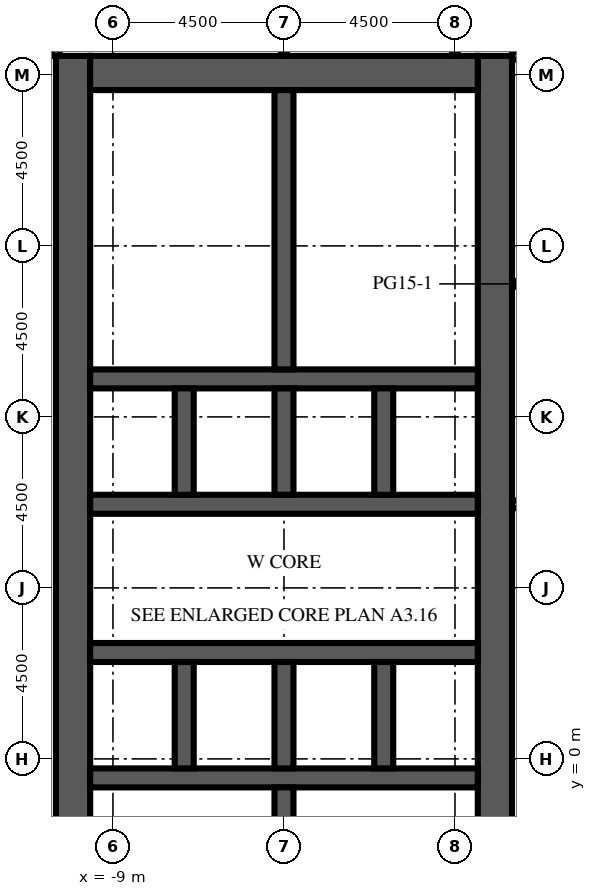
"""IFC4 building model, lengths in metres.
Left out: names, types, materials, properties, quantities, classifications, styles, units other than length and angle.
Written with IfcOpenShell. Run it as: python <this file> out.ifc"""

import sys

from ifc_helpers import new_model, si_unit, direction, frame, frame_2d, origin, place, context, subcontext, project, spatial, rectangle, extrude, element, fill, save


model = new_model("IFC4")
c1 = context("Model", 3, precision=1e-05, world=origin(), true_north=direction((0.0, 1.0)))
c2 = subcontext(c1, "Body", "Model", "MODEL_VIEW")
j1 = project(units=[si_unit("LENGTHUNIT", "METRE"), si_unit("PLANEANGLEUNIT", "RADIAN")], contexts=[c1])
p1 = place(None, origin())
s1 = spatial("IfcSite", under=j1, at=p1, CompositionType="ELEMENT")
p2 = place(p1, origin())
s2 = spatial("IfcBuilding", under=s1, at=p2, CompositionType="ELEMENT")
p3 = place(p2, frame((0.0, 0.0, 98.4)))
s3 = spatial("IfcBuildingStorey", under=s2, at=p3, CompositionType="ELEMENT", Elevation=98.4)
p4 = place(p3, frame((-10.05, -9.0, 0.0), z_axis=(0.0, 0.0, 1.0), x_axis=(0.0, 1.0, 0.0)))
e1 = element("IfcWall", 1, at=p4, inside=s3, PredefinedType="SHEAR", context=c2, shape_type="SweptSolid", body=[
    extrude(rectangle(XDim=27.5, YDim=0.9, at=frame_2d((13.75, 0.0))), origin(), (0.0, 0.0, 1.0), 4.1),
])
p5 = place(p4, frame((12.55, 0.0, 0.0)))
e2 = element("IfcOpeningElement", 2, at=p5, cuts=e1, PredefinedType="OPENING", context=c2, shape_type="SweptSolid", body=[
    extrude(rectangle(XDim=2.4, YDim=2.4, at=frame_2d((1.2, 1.2))), frame((0.0, 0.46, 0.0), z_axis=(0.0, -1.0, 0.0), x_axis=(1.0, 0.0, 0.0)), (0.0, 0.0, 1.0), 0.92),
])
p6 = place(p4, frame((6.825, 0.0, 0.0)))
e3 = element("IfcOpeningElement", 3, at=p6, cuts=e1, PredefinedType="OPENING", context=c2, shape_type="SweptSolid", body=[
    extrude(rectangle(XDim=1.2, YDim=2.1, at=frame_2d((0.6, 1.05))), frame((0.0, 0.46, 0.0), z_axis=(0.0, -1.0, 0.0), x_axis=(1.0, 0.0, 0.0)), (0.0, 0.0, 1.0), 0.92),
])
p7 = place(p4, frame((19.475, 0.0, 0.0)))
e4 = element("IfcOpeningElement", 4, at=p7, cuts=e1, PredefinedType="OPENING", context=c2, shape_type="SweptSolid", body=[
    extrude(rectangle(XDim=1.2, YDim=2.1, at=frame_2d((0.6, 1.05))), frame((0.0, 0.46, 0.0), z_axis=(0.0, -1.0, 0.0), x_axis=(1.0, 0.0, 0.0)), (0.0, 0.0, 1.0), 0.92),
])
p8 = place(p3, frame((1.05, -9.0, 0.0), z_axis=(0.0, 0.0, 1.0), x_axis=(0.0, 1.0, 0.0)))
e5 = element("IfcWall", 5, at=p8, inside=s3, PredefinedType="SHEAR", context=c2, shape_type="SweptSolid", body=[
    extrude(rectangle(XDim=27.5, YDim=0.9, at=frame_2d((13.75, 0.0))), origin(), (0.0, 0.0, 1.0), 4.1),
])
p9 = place(p8, frame((12.55, 0.0, 0.0)))
e6 = element("IfcOpeningElement", 6, at=p9, cuts=e5, PredefinedType="OPENING", context=c2, shape_type="SweptSolid", body=[
    extrude(rectangle(XDim=2.4, YDim=2.4, at=frame_2d((1.2, 1.2))), frame((0.0, 0.46, 0.0), z_axis=(0.0, -1.0, 0.0), x_axis=(1.0, 0.0, 0.0)), (0.0, 0.0, 1.0), 0.92),
])
p10 = place(p8, frame((3.893, 0.0, 0.0)))
e7 = element("IfcOpeningElement", 7, at=p10, cuts=e5, PredefinedType="OPENING", context=c2, shape_type="SweptSolid", body=[
    extrude(rectangle(XDim=0.923, YDim=2.1, at=frame_2d((0.461, 1.05))), frame((0.0, 0.46, 0.0), z_axis=(0.0, -1.0, 0.0), x_axis=(1.0, 0.0, 0.0)), (0.0, 0.0, 1.0), 0.92),
])
p11 = place(p8, frame((23.427, 0.0, 0.0)))
e8 = element("IfcOpeningElement", 8, at=p11, cuts=e5, PredefinedType="OPENING", context=c2, shape_type="SweptSolid", body=[
    extrude(rectangle(XDim=1.2, YDim=2.1, at=frame_2d((0.6, 1.05))), frame((0.0, 0.46, 0.0), z_axis=(0.0, -1.0, 0.0), x_axis=(1.0, 0.0, 0.0)), (0.0, 0.0, 1.0), 0.92),
])
p12 = place(p3, frame((-9.6, 18.05, 0.0), z_axis=(0.0, 0.0, 1.0), x_axis=(1.0, 0.0, 0.0)))
e9 = element("IfcWall", 9, at=p12, inside=s3, PredefinedType="SHEAR", context=c2, shape_type="SweptSolid", body=[
    extrude(rectangle(XDim=10.2, YDim=0.9, at=frame_2d((5.1, 0.0))), origin(), (0.0, 0.0, 1.0), 4.1),
])
p13 = place(p3, frame((-9.6, -0.5, 0.0), z_axis=(0.0, 0.0, 1.0), x_axis=(1.0, 0.0, 0.0)))
e10 = element("IfcWall", 10, at=p13, inside=s3, PredefinedType="SHEAR", context=c2, shape_type="SweptSolid", body=[
    extrude(rectangle(XDim=10.2, YDim=0.5, at=frame_2d((5.1, 0.0))), origin(), (0.0, 0.0, 1.0), 4.1),
])
p14 = place(p3, frame((-9.6, 2.8, 0.0), z_axis=(0.0, 0.0, 1.0), x_axis=(1.0, 0.0, 0.0)))
e11 = element("IfcWall", 11, at=p14, inside=s3, PredefinedType="SHEAR", context=c2, shape_type="SweptSolid", body=[
    extrude(rectangle(XDim=10.2, YDim=0.5, at=frame_2d((5.1, 0.0))), origin(), (0.0, 0.0, 1.0), 4.1),
])
p15 = place(p14, frame((0.562, 0.0, 0.0)))
e12 = element("IfcOpeningElement", 12, at=p15, cuts=e11, PredefinedType="OPENING", context=c2, shape_type="SweptSolid", body=[
    extrude(rectangle(XDim=1.1, YDim=2.1, at=frame_2d((0.55, 1.05))), frame((0.0, 0.26, 0.0), z_axis=(0.0, -1.0, 0.0), x_axis=(1.0, 0.0, 0.0)), (0.0, 0.0, 1.0), 0.52),
])
p16 = place(p14, frame((3.238, 0.0, 0.0)))
e13 = element("IfcOpeningElement", 13, at=p16, cuts=e11, PredefinedType="OPENING", context=c2, shape_type="SweptSolid", body=[
    extrude(rectangle(XDim=1.1, YDim=2.1, at=frame_2d((0.55, 1.05))), frame((0.0, 0.26, 0.0), z_axis=(0.0, -1.0, 0.0), x_axis=(1.0, 0.0, 0.0)), (0.0, 0.0, 1.0), 0.52),
])
p17 = place(p14, frame((8.538, 0.0, 0.0)))
e14 = element("IfcOpeningElement", 14, at=p17, cuts=e11, PredefinedType="OPENING", context=c2, shape_type="SweptSolid", body=[
    extrude(rectangle(XDim=1.1, YDim=2.1, at=frame_2d((0.55, 1.05))), frame((0.0, 0.26, 0.0), z_axis=(0.0, -1.0, 0.0), x_axis=(1.0, 0.0, 0.0)), (0.0, 0.0, 1.0), 0.52),
])
p18 = place(p3, frame((-9.6, 6.7, 0.0), z_axis=(0.0, 0.0, 1.0), x_axis=(1.0, 0.0, 0.0)))
e15 = element("IfcWall", 15, at=p18, inside=s3, PredefinedType="SHEAR", context=c2, shape_type="SweptSolid", body=[
    extrude(rectangle(XDim=10.2, YDim=0.5, at=frame_2d((5.1, 0.0))), origin(), (0.0, 0.0, 1.0), 4.1),
])
p19 = place(p18, frame((0.562, 0.0, 0.0)))
e16 = element("IfcOpeningElement", 16, at=p19, cuts=e15, PredefinedType="OPENING", context=c2, shape_type="SweptSolid", body=[
    extrude(rectangle(XDim=1.1, YDim=2.1, at=frame_2d((0.55, 1.05))), frame((0.0, 0.26, 0.0), z_axis=(0.0, -1.0, 0.0), x_axis=(1.0, 0.0, 0.0)), (0.0, 0.0, 1.0), 0.52),
])
p20 = place(p18, frame((3.288, 0.0, 0.0)))
e17 = element("IfcOpeningElement", 17, at=p20, cuts=e15, PredefinedType="OPENING", context=c2, shape_type="SweptSolid", body=[
    extrude(rectangle(XDim=1.0, YDim=2.1, at=frame_2d((0.5, 1.05))), frame((0.0, 0.26, 0.0), z_axis=(0.0, -1.0, 0.0), x_axis=(1.0, 0.0, 0.0)), (0.0, 0.0, 1.0), 0.52),
])
p21 = place(p18, frame((5.913, 0.0, 0.0)))
e18 = element("IfcOpeningElement", 18, at=p21, cuts=e15, PredefinedType="OPENING", context=c2, shape_type="SweptSolid", body=[
    extrude(rectangle(XDim=1.0, YDim=2.1, at=frame_2d((0.5, 1.05))), frame((0.0, 0.26, 0.0), z_axis=(0.0, -1.0, 0.0), x_axis=(1.0, 0.0, 0.0)), (0.0, 0.0, 1.0), 0.52),
])
p22 = place(p18, frame((8.587, 0.0, 0.0)))
e19 = element("IfcOpeningElement", 19, at=p22, cuts=e15, PredefinedType="OPENING", context=c2, shape_type="SweptSolid", body=[
    extrude(rectangle(XDim=1.0, YDim=2.1, at=frame_2d((0.5, 1.05))), frame((0.0, 0.26, 0.0), z_axis=(0.0, -1.0, 0.0), x_axis=(1.0, 0.0, 0.0)), (0.0, 0.0, 1.0), 0.52),
])
p23 = place(p3, frame((-9.6, 10.0, 0.0), z_axis=(0.0, 0.0, 1.0), x_axis=(1.0, 0.0, 0.0)))
e20 = element("IfcWall", 20, at=p23, inside=s3, PredefinedType="SHEAR", context=c2, shape_type="SweptSolid", body=[
    extrude(rectangle(XDim=10.2, YDim=0.5, at=frame_2d((5.1, 0.0))), origin(), (0.0, 0.0, 1.0), 4.1),
])
for number, where, z_axis, x_axis in (
    (21, (-7.125, -0.25, 0.0), (0.0, 0.0, 1.0), (0.0, 1.0, 0.0)),
    (22, (-7.125, 6.95, 0.0), (0.0, 0.0, 1.0), (0.0, 1.0, 0.0)),
    (23, (-4.5, -0.25, 0.0), (0.0, 0.0, 1.0), (0.0, 1.0, 0.0)),
    (24, (-4.5, 6.95, 0.0), (0.0, 0.0, 1.0), (0.0, 1.0, 0.0)),
    (25, (-1.875, -0.25, 0.0), (0.0, 0.0, 1.0), (0.0, 1.0, 0.0)),
    (26, (-1.875, 6.95, 0.0), (0.0, 0.0, 1.0), (0.0, 1.0, 0.0)),
):
    element("IfcWall", number, at=place(p3, frame(where, z_axis=z_axis, x_axis=x_axis)), inside=s3, PredefinedType="SHEAR", context=c2, shape_type="SweptSolid", body=[
        extrude(rectangle(XDim=2.8, YDim=0.5, at=frame_2d((1.4, 0.0))), origin(), (0.0, 0.0, 1.0), 4.1),
    ])
for number, where, z_axis, x_axis in (
    (27, (-4.5, -8.1, 0.0), (0.0, 0.0, 1.0), (0.0, 1.0, 0.0)),
    (28, (-4.5, 10.25, 0.0), (0.0, 0.0, 1.0), (0.0, 1.0, 0.0)),
):
    element("IfcWall", number, at=place(p3, frame(where, z_axis=z_axis, x_axis=x_axis)), inside=s3, PredefinedType="SHEAR", context=c2, shape_type="SweptSolid", body=[
        extrude(rectangle(XDim=7.35, YDim=0.5, at=frame_2d((3.675, 0.0))), origin(), (0.0, 0.0, 1.0), 4.1),
    ])
p24 = place(p3, frame((-2.407, -3.984, 0.0), z_axis=(0.0, 0.0, 1.0), x_axis=(0.0, 1.0, 0.0)))
e29 = element("IfcWall", 29, at=p24, inside=s3, PredefinedType="PARTITIONING", context=c2, shape_type="SweptSolid", body=[
    extrude(rectangle(XDim=3.234, YDim=0.1, at=frame_2d((1.617, 0.0))), origin(), (0.0, 0.0, 1.0), 3.65),
])
p25 = place(p3, frame((-0.7, 12.455, 0.0), z_axis=(0.0, 0.0, 1.0), x_axis=(1.0, 0.0, 0.0)))
e30 = element("IfcWall", 30, at=p25, inside=s3, PredefinedType="PARTITIONING", context=c2, shape_type="SweptSolid", body=[
    extrude(rectangle(XDim=1.3, YDim=0.1, at=frame_2d((0.65, 0.0))), origin(), (0.0, 0.0, 1.0), 3.65),
])
p26 = place(p25, frame((0.2, 0.0, 0.0)))
e31 = element("IfcOpeningElement", 31, at=p26, cuts=e30, PredefinedType="OPENING", context=c2, shape_type="SweptSolid", body=[
    extrude(rectangle(XDim=0.9, YDim=2.1, at=frame_2d((0.45, 1.05))), frame((0.0, 0.06, 0.0), z_axis=(0.0, -1.0, 0.0), x_axis=(1.0, 0.0, 0.0)), (0.0, 0.0, 1.0), 0.12),
])
p27 = place(p3, frame((-4.25, 12.455, 0.0), z_axis=(0.0, 0.0, 1.0), x_axis=(1.0, 0.0, 0.0)))
e32 = element("IfcWall", 32, at=p27, inside=s3, PredefinedType="PARTITIONING", context=c2, shape_type="SweptSolid", body=[
    extrude(rectangle(XDim=3.55, YDim=0.1, at=frame_2d((1.775, 0.0))), origin(), (0.0, 0.0, 1.0), 3.65),
])
p28 = place(p3, frame((-0.7, 12.455, 0.0), z_axis=(0.0, 0.0, 1.0), x_axis=(0.0, 1.0, 0.0)))
e33 = element("IfcWall", 33, at=p28, inside=s3, PredefinedType="PARTITIONING", context=c2, shape_type="SweptSolid", body=[
    extrude(rectangle(XDim=2.573, YDim=0.1, at=frame_2d((1.286, 0.0))), origin(), (0.0, 0.0, 1.0), 3.65),
])
p29 = place(p28, frame((0.786, 0.0, 0.0)))
e34 = element("IfcOpeningElement", 34, at=p29, cuts=e33, PredefinedType="OPENING", context=c2, shape_type="SweptSolid", body=[
    extrude(rectangle(XDim=1.0, YDim=2.1, at=frame_2d((0.5, 1.05))), frame((0.0, 0.06, 0.0), z_axis=(0.0, -1.0, 0.0), x_axis=(1.0, 0.0, 0.0)), (0.0, 0.0, 1.0), 0.12),
])
p30 = place(p3, frame((-0.7, 15.028, 0.0), z_axis=(0.0, 0.0, 1.0), x_axis=(0.0, 1.0, 0.0)))
e35 = element("IfcWall", 35, at=p30, inside=s3, PredefinedType="PARTITIONING", context=c2, shape_type="SweptSolid", body=[
    extrude(rectangle(XDim=2.573, YDim=0.1, at=frame_2d((1.286, 0.0))), origin(), (0.0, 0.0, 1.0), 3.65),
])
p31 = place(p30, frame((0.786, 0.0, 0.0)))
e36 = element("IfcOpeningElement", 36, at=p31, cuts=e35, PredefinedType="OPENING", context=c2, shape_type="SweptSolid", body=[
    extrude(rectangle(XDim=1.0, YDim=2.1, at=frame_2d((0.5, 1.05))), frame((0.0, 0.06, 0.0), z_axis=(0.0, -1.0, 0.0), x_axis=(1.0, 0.0, 0.0)), (0.0, 0.0, 1.0), 0.12),
])
p32 = place(p3, frame((-4.25, 15.028, 0.0), z_axis=(0.0, 0.0, 1.0), x_axis=(1.0, 0.0, 0.0)))
e37 = element("IfcWall", 37, at=p32, inside=s3, PredefinedType="PARTITIONING", context=c2, shape_type="SweptSolid", body=[
    extrude(rectangle(XDim=3.55, YDim=0.1, at=frame_2d((1.775, 0.0))), origin(), (0.0, 0.0, 1.0), 3.65),
])
p33 = place(p3, frame((-10.5, 31.35, 0.0), z_axis=(0.0, 0.0, 1.0), x_axis=(0.0, -1.0, 0.0)))
e38 = element("IfcWall", 38, at=p33, inside=s3, PredefinedType="PARTITIONING", context=c2, shape_type="SweptSolid", body=[
    extrude(rectangle(XDim=12.85, YDim=0.2, at=frame_2d((6.425, 0.0))), origin(), (0.0, 0.0, 1.0), 3.65),
])
p34 = place(p33, frame((2.5, 0.0, 0.0)))
e39 = element("IfcOpeningElement", 39, at=p34, cuts=e38, PredefinedType="OPENING", context=c2, shape_type="SweptSolid", body=[
    extrude(rectangle(XDim=1.0, YDim=2.1, at=frame_2d((0.5, 1.05))), frame((0.0, 0.11, 0.0), z_axis=(0.0, -1.0, 0.0), x_axis=(1.0, 0.0, 0.0)), (0.0, 0.0, 1.0), 0.22),
])
p35 = place(p3, frame((-4.5, 30.9, 0.0), z_axis=(0.0, 0.0, 1.0), x_axis=(0.0, -1.0, 0.0)))
e40 = element("IfcWall", 40, at=p35, inside=s3, PredefinedType="PARTITIONING", context=c2, shape_type="SweptSolid", body=[
    extrude(rectangle(XDim=12.4, YDim=0.15, at=frame_2d((6.2, 0.0))), origin(), (0.0, 0.0, 1.0), 3.65),
])
p36 = place(p35, frame((3.3, 0.0, 0.0)))
e41 = element("IfcOpeningElement", 41, at=p36, cuts=e40, PredefinedType="OPENING", context=c2, shape_type="SweptSolid", body=[
    extrude(rectangle(XDim=1.0, YDim=2.1, at=frame_2d((0.5, 1.05))), frame((0.0, 0.085, 0.0), z_axis=(0.0, -1.0, 0.0), x_axis=(1.0, 0.0, 0.0)), (0.0, 0.0, 1.0), 0.17),
])
p37 = place(p3, frame((0.0, 18.5, 0.0), z_axis=(0.0, 0.0, 1.0), x_axis=(0.0, 1.0, 0.0)))
e42 = element("IfcWall", 42, at=p37, inside=s3, PredefinedType="PARTITIONING", context=c2, shape_type="SweptSolid", body=[
    extrude(rectangle(XDim=3.3, YDim=0.15, at=frame_2d((1.65, 0.0))), origin(), (0.0, 0.0, 1.0), 3.65),
])
p38 = place(p3, frame((1.5, 6.7, 0.0), z_axis=(0.0, 0.0, 1.0), x_axis=(1.0, 0.0, 0.0)))
e43 = element("IfcWall", 43, at=p38, inside=s3, PredefinedType="PARTITIONING", context=c2, shape_type="SweptSolid", body=[
    extrude(rectangle(XDim=4.5, YDim=0.2, at=frame_2d((2.25, 0.0))), origin(), (0.0, 0.0, 1.0), 3.65),
])
p39 = place(p38, frame((2.35, 0.0, 0.0)))
e44 = element("IfcOpeningElement", 44, at=p39, cuts=e43, PredefinedType="OPENING", context=c2, shape_type="SweptSolid", body=[
    extrude(rectangle(XDim=1.0, YDim=2.1, at=frame_2d((0.5, 1.05))), frame((0.0, 0.11, 0.0), z_axis=(0.0, -1.0, 0.0), x_axis=(1.0, 0.0, 0.0)), (0.0, 0.0, 1.0), 0.22),
])
p40 = place(p3, frame((1.5, 12.5, 0.0), z_axis=(0.0, 0.0, 1.0), x_axis=(1.0, 0.0, 0.0)))
e45 = element("IfcWall", 45, at=p40, inside=s3, PredefinedType="PARTITIONING", context=c2, shape_type="SweptSolid", body=[
    extrude(rectangle(XDim=4.5, YDim=0.15, at=frame_2d((2.25, 0.0))), origin(), (0.0, 0.0, 1.0), 3.65),
])
p41 = place(p40, frame((1.85, 0.0, 0.0)))
e46 = element("IfcOpeningElement", 46, at=p41, cuts=e45, PredefinedType="OPENING", context=c2, shape_type="SweptSolid", body=[
    extrude(rectangle(XDim=1.0, YDim=2.1, at=frame_2d((0.5, 1.05))), frame((0.0, 0.085, 0.0), z_axis=(0.0, -1.0, 0.0), x_axis=(1.0, 0.0, 0.0)), (0.0, 0.0, 1.0), 0.17),
])
p42 = place(p3, frame((1.5, 18.5, 0.0), z_axis=(0.0, 0.0, 1.0), x_axis=(1.0, 0.0, 0.0)))
e47 = element("IfcWall", 47, at=p42, inside=s3, PredefinedType="PARTITIONING", context=c2, shape_type="SweptSolid", body=[
    extrude(rectangle(XDim=4.5, YDim=0.2, at=frame_2d((2.25, 0.0))), origin(), (0.0, 0.0, 1.0), 3.65),
])
p43 = place(p15, origin())
e48 = element("IfcDoor", 48, at=p43, inside=s3, OperationType="DOUBLE_DOOR_SLIDING", PredefinedType="DOOR", context=c2, shape_type="SweptSolid", body=[
    extrude(rectangle(XDim=1.1, YDim=2.1, at=frame_2d((0.55, 1.05))), frame((0.0, 0.025, 0.0), z_axis=(0.0, -1.0, 0.0), x_axis=(1.0, 0.0, 0.0)), (0.0, 0.0, 1.0), 0.05),
])
fill(e12, e48)
p44 = place(p16, origin())
e49 = element("IfcDoor", 49, at=p44, inside=s3, OperationType="DOUBLE_DOOR_SLIDING", PredefinedType="DOOR", context=c2, shape_type="SweptSolid", body=[
    extrude(rectangle(XDim=1.1, YDim=2.1, at=frame_2d((0.55, 1.05))), frame((0.0, 0.025, 0.0), z_axis=(0.0, -1.0, 0.0), x_axis=(1.0, 0.0, 0.0)), (0.0, 0.0, 1.0), 0.05),
])
fill(e13, e49)
p45 = place(p17, origin())
e50 = element("IfcDoor", 50, at=p45, inside=s3, OperationType="DOUBLE_DOOR_SLIDING", PredefinedType="DOOR", context=c2, shape_type="SweptSolid", body=[
    extrude(rectangle(XDim=1.1, YDim=2.1, at=frame_2d((0.55, 1.05))), frame((0.0, 0.025, 0.0), z_axis=(0.0, -1.0, 0.0), x_axis=(1.0, 0.0, 0.0)), (0.0, 0.0, 1.0), 0.05),
])
fill(e14, e50)
p46 = place(p19, origin())
e51 = element("IfcDoor", 51, at=p46, inside=s3, OperationType="DOUBLE_DOOR_SLIDING", PredefinedType="DOOR", context=c2, shape_type="SweptSolid", body=[
    extrude(rectangle(XDim=1.1, YDim=2.1, at=frame_2d((0.55, 1.05))), frame((0.0, 0.025, 0.0), z_axis=(0.0, -1.0, 0.0), x_axis=(1.0, 0.0, 0.0)), (0.0, 0.0, 1.0), 0.05),
])
fill(e16, e51)
p47 = place(p5, origin())
e52 = element("IfcDoor", 52, at=p47, inside=s3, OperationType="DOUBLE_DOOR_DOUBLE_SWING", PredefinedType="DOOR", context=c2, shape_type="SweptSolid", body=[
    extrude(rectangle(XDim=2.4, YDim=2.4, at=frame_2d((1.2, 1.2))), frame((0.0, 0.025, 0.0), z_axis=(0.0, -1.0, 0.0), x_axis=(1.0, 0.0, 0.0)), (0.0, 0.0, 1.0), 0.05),
])
fill(e2, e52)
p48 = place(p9, origin())
e53 = element("IfcDoor", 53, at=p48, inside=s3, OperationType="DOUBLE_DOOR_DOUBLE_SWING", PredefinedType="DOOR", context=c2, shape_type="SweptSolid", body=[
    extrude(rectangle(XDim=2.4, YDim=2.4, at=frame_2d((1.2, 1.2))), frame((0.0, 0.025, 0.0), z_axis=(0.0, -1.0, 0.0), x_axis=(1.0, 0.0, 0.0)), (0.0, 0.0, 1.0), 0.05),
])
fill(e6, e53)
p49 = place(p6, origin())
e54 = element("IfcDoor", 54, at=p49, inside=s3, OperationType="SINGLE_SWING_LEFT", PredefinedType="DOOR", context=c2, shape_type="SweptSolid", body=[
    extrude(rectangle(XDim=1.2, YDim=2.1, at=frame_2d((0.6, 1.05))), frame((0.0, 0.025, 0.0), z_axis=(0.0, -1.0, 0.0), x_axis=(1.0, 0.0, 0.0)), (0.0, 0.0, 1.0), 0.05),
])
fill(e3, e54)
p50 = place(p7, origin())
e55 = element("IfcDoor", 55, at=p50, inside=s3, OperationType="SINGLE_SWING_LEFT", PredefinedType="DOOR", context=c2, shape_type="SweptSolid", body=[
    extrude(rectangle(XDim=1.2, YDim=2.1, at=frame_2d((0.6, 1.05))), frame((0.0, 0.025, 0.0), z_axis=(0.0, -1.0, 0.0), x_axis=(1.0, 0.0, 0.0)), (0.0, 0.0, 1.0), 0.05),
])
fill(e4, e55)
p51 = place(p20, origin())
e56 = element("IfcDoor", 56, at=p51, inside=s3, OperationType="SINGLE_SWING_RIGHT", PredefinedType="DOOR", context=c2, shape_type="SweptSolid", body=[
    extrude(rectangle(XDim=1.0, YDim=2.1, at=frame_2d((0.5, 1.05))), frame((0.0, 0.025, 0.0), z_axis=(0.0, -1.0, 0.0), x_axis=(1.0, 0.0, 0.0)), (0.0, 0.0, 1.0), 0.05),
])
fill(e17, e56)
p52 = place(p21, origin())
e57 = element("IfcDoor", 57, at=p52, inside=s3, OperationType="SINGLE_SWING_LEFT", PredefinedType="DOOR", context=c2, shape_type="SweptSolid", body=[
    extrude(rectangle(XDim=1.0, YDim=2.1, at=frame_2d((0.5, 1.05))), frame((0.0, 0.025, 0.0), z_axis=(0.0, -1.0, 0.0), x_axis=(1.0, 0.0, 0.0)), (0.0, 0.0, 1.0), 0.05),
])
fill(e18, e57)
p53 = place(p22, origin())
e58 = element("IfcDoor", 58, at=p53, inside=s3, OperationType="SINGLE_SWING_RIGHT", PredefinedType="DOOR", context=c2, shape_type="SweptSolid", body=[
    extrude(rectangle(XDim=1.0, YDim=2.1, at=frame_2d((0.5, 1.05))), frame((0.0, 0.025, 0.0), z_axis=(0.0, -1.0, 0.0), x_axis=(1.0, 0.0, 0.0)), (0.0, 0.0, 1.0), 0.05),
])
fill(e19, e58)
p54 = place(p26, origin())
e59 = element("IfcDoor", 59, at=p54, inside=s3, OperationType="SINGLE_SWING_LEFT", PredefinedType="DOOR", context=c2, shape_type="SweptSolid", body=[
    extrude(rectangle(XDim=0.9, YDim=2.1, at=frame_2d((0.45, 1.05))), frame((0.0, 0.025, 0.0), z_axis=(0.0, -1.0, 0.0), x_axis=(1.0, 0.0, 0.0)), (0.0, 0.0, 1.0), 0.05),
])
fill(e31, e59)
p55 = place(p11, origin())
e60 = element("IfcDoor", 60, at=p55, inside=s3, OperationType="SINGLE_SWING_RIGHT", PredefinedType="DOOR", context=c2, shape_type="SweptSolid", body=[
    extrude(rectangle(XDim=1.2, YDim=2.1, at=frame_2d((0.6, 1.05))), frame((0.0, 0.425, 0.0), z_axis=(0.0, -1.0, 0.0), x_axis=(1.0, 0.0, 0.0)), (0.0, 0.0, 1.0), 0.05),
])
fill(e8, e60)
p56 = place(p29, origin())
e61 = element("IfcDoor", 61, at=p56, inside=s3, OperationType="SINGLE_SWING_LEFT", PredefinedType="DOOR", context=c2, shape_type="SweptSolid", body=[
    extrude(rectangle(XDim=1.0, YDim=2.1, at=frame_2d((0.5, 1.05))), frame((0.0, 0.025, 0.0), z_axis=(0.0, -1.0, 0.0), x_axis=(1.0, 0.0, 0.0)), (0.0, 0.0, 1.0), 0.05),
])
fill(e34, e61)
p57 = place(p31, origin())
e62 = element("IfcDoor", 62, at=p57, inside=s3, OperationType="SINGLE_SWING_RIGHT", PredefinedType="DOOR", context=c2, shape_type="SweptSolid", body=[
    extrude(rectangle(XDim=1.0, YDim=2.1, at=frame_2d((0.5, 1.05))), frame((0.0, 0.025, 0.0), z_axis=(0.0, -1.0, 0.0), x_axis=(1.0, 0.0, 0.0)), (0.0, 0.0, 1.0), 0.05),
])
fill(e36, e62)
save(model, sys.argv[1])
